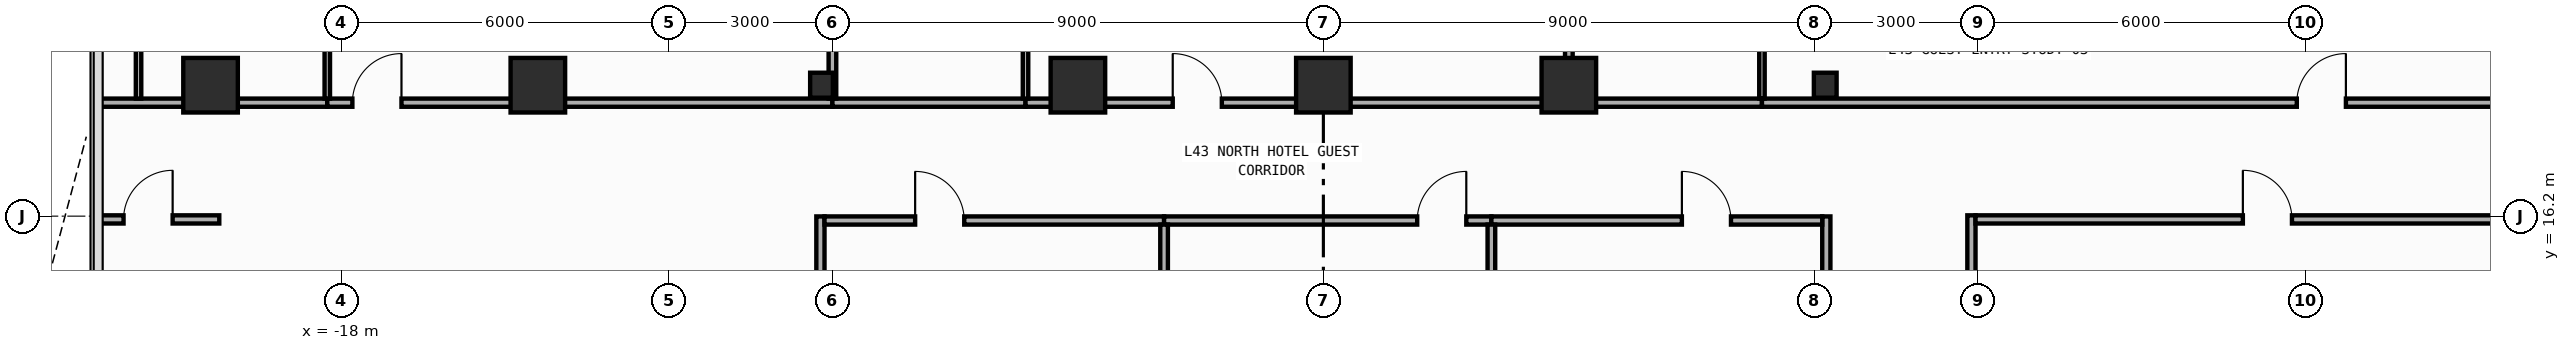
"""IFC4 building model, lengths in metres.
Left out: names, types, materials, properties, quantities, classifications, styles, units other than length and angle.
Written with IfcOpenShell. Run it as: python <this file> out.ifc"""

import sys

from ifc_helpers import new_model, si_unit, direction, frame, frame_2d, origin, origin_2d, place, context, subcontext, project, spatial, rectangle, i_section, extrude, element, fill, save


model = new_model("IFC4")
c1 = context("Model", 3, precision=1e-05, world=origin(), true_north=direction((0.0, 1.0)))
c2 = subcontext(c1, "Body", "Model", "MODEL_VIEW")
j1 = project(units=[si_unit("LENGTHUNIT", "METRE"), si_unit("PLANEANGLEUNIT", "RADIAN")], contexts=[c1])
p1 = place(None, origin())
s1 = spatial("IfcSite", under=j1, at=p1, CompositionType="ELEMENT")
p2 = place(p1, origin())
s2 = spatial("IfcBuilding", under=s1, at=p2, CompositionType="ELEMENT")
p3 = place(p2, frame((0.0, 0.0, 187.8)))
s3 = spatial("IfcBuildingStorey", under=s2, at=p3, CompositionType="ELEMENT", Elevation=187.8)
for number, where, z_axis, x_axis in (
    (1, (-9.2, 18.6, 0.0), (0.0, 0.0, 1.0), (1.0, 0.0, 0.0)),
    (2, (9.2, 18.6, 0.0), (0.0, 0.0, 1.0), (1.0, 0.0, 0.0)),
):
    element("IfcColumn", number, at=place(p3, frame(where, z_axis=z_axis, x_axis=x_axis)), inside=s3, PredefinedType="COLUMN", context=c2, shape_type="SweptSolid", body=[
        extrude(i_section(OverallWidth=0.417, OverallDepth=0.458, WebThickness=0.03, FlangeThickness=0.05, FilletRadius=0.022, at=origin_2d()), origin(), (0.0, 0.0, 1.0), 3.8),
    ])
for number, where, z_axis, x_axis in (
    (3, (-20.4, 18.6, 0.0), (0.0, 0.0, 1.0), (1.0, 0.0, 0.0)),
    (4, (-14.4, 18.6, 0.0), (0.0, 0.0, 1.0), (1.0, 0.0, 0.0)),
    (5, (-4.5, 18.6, 0.0), (0.0, 0.0, 1.0), (1.0, 0.0, 0.0)),
    (6, (0.0, 18.6, 0.0), (0.0, 0.0, 1.0), (1.0, 0.0, 0.0)),
    (7, (4.5, 18.6, 0.0), (0.0, 0.0, 1.0), (1.0, 0.0, 0.0)),
):
    element("IfcColumn", number, at=place(p3, frame(where, z_axis=z_axis, x_axis=x_axis)), inside=s3, PredefinedType="COLUMN", context=c2, shape_type="SweptSolid", body=[
        extrude(rectangle(XDim=1.0, YDim=1.0, at=origin_2d()), origin(), (0.0, 0.0, 1.0), 3.8),
    ])
p4 = place(p3, frame((-9.22, -5.8, 0.0), z_axis=(0.0, 0.0, 1.0), x_axis=(0.0, 1.0, 0.0)))
e8 = element("IfcWall", 8, at=p4, inside=s3, PredefinedType="PARTITIONING", context=c2, shape_type="SweptSolid", body=[
    extrude(rectangle(XDim=21.995, YDim=0.15, at=frame_2d((10.998, 0.0))), origin(), (0.0, 0.0, 1.0), 2.952),
])
p5 = place(p4, frame((10.749, 0.0, 0.0)))
e9 = element("IfcOpeningElement", 9, at=p5, cuts=e8, PredefinedType="OPENING", context=c2, shape_type="SweptSolid", body=[
    extrude(rectangle(XDim=0.9, YDim=2.15, at=frame_2d((0.45, 1.075))), frame((0.0, 0.085, 0.0), z_axis=(0.0, -1.0, 0.0), x_axis=(1.0, 0.0, 0.0)), (0.0, 0.0, 1.0), 0.17),
])
p6 = place(p3, frame((9.22, -5.8, 0.0), z_axis=(0.0, 0.0, 1.0), x_axis=(0.0, 1.0, 0.0)))
e10 = element("IfcWall", 10, at=p6, inside=s3, PredefinedType="PARTITIONING", context=c2, shape_type="SweptSolid", body=[
    extrude(rectangle(XDim=21.995, YDim=0.15, at=frame_2d((10.998, 0.0))), origin(), (0.0, 0.0, 1.0), 2.952),
])
p7 = place(p6, frame((10.749, 0.0, 0.0)))
e11 = element("IfcOpeningElement", 11, at=p7, cuts=e10, PredefinedType="OPENING", context=c2, shape_type="SweptSolid", body=[
    extrude(rectangle(XDim=0.9, YDim=2.15, at=frame_2d((0.45, 1.075))), frame((0.0, 0.085, 0.0), z_axis=(0.0, -1.0, 0.0), x_axis=(1.0, 0.0, 0.0)), (0.0, 0.0, 1.0), 0.17),
])
p8 = place(p3, frame((11.88, 7.16, 0.0), z_axis=(0.0, 0.0, 1.0), x_axis=(0.0, 1.0, 0.0)))
e12 = element("IfcWall", 12, at=p8, inside=s3, PredefinedType="PARTITIONING", context=c2, shape_type="SweptSolid", body=[
    extrude(rectangle(XDim=9.055, YDim=0.15, at=frame_2d((4.528, 0.0))), origin(), (0.0, 0.0, 1.0), 3.54),
])
p9 = place(p8, frame((0.46, 0.0, 0.0)))
e13 = element("IfcOpeningElement", 13, at=p9, cuts=e12, PredefinedType="OPENING", context=c2, shape_type="SweptSolid", body=[
    extrude(rectangle(XDim=0.9, YDim=2.15, at=frame_2d((0.45, 1.075))), frame((0.0, 0.085, 0.0), z_axis=(0.0, -1.0, 0.0), x_axis=(1.0, 0.0, 0.0)), (0.0, 0.0, 1.0), 0.17),
])
p10 = place(p3, frame((-9.145, 16.12, 0.0), z_axis=(0.0, 0.0, 1.0), x_axis=(1.0, 0.0, 0.0)))
e14 = element("IfcWall", 14, at=p10, inside=s3, PredefinedType="PARTITIONING", context=c2, shape_type="SweptSolid", body=[
    extrude(rectangle(XDim=6.225, YDim=0.15, at=frame_2d((3.113, 0.0))), origin(), (0.0, 0.0, 1.0), 3.54),
])
p11 = place(p10, frame((1.661, 0.0, 0.0)))
e15 = element("IfcOpeningElement", 15, at=p11, cuts=e14, PredefinedType="OPENING", context=c2, shape_type="SweptSolid", body=[
    extrude(rectangle(XDim=0.9, YDim=2.15, at=frame_2d((0.45, 1.075))), frame((0.0, 0.085, 0.0), z_axis=(0.0, -1.0, 0.0), x_axis=(1.0, 0.0, 0.0)), (0.0, 0.0, 1.0), 0.17),
])
p12 = place(p3, frame((-2.92, 16.12, 0.0), z_axis=(0.0, 0.0, 1.0), x_axis=(1.0, 0.0, 0.0)))
e16 = element("IfcWall", 16, at=p12, inside=s3, PredefinedType="PARTITIONING", context=c2, shape_type="SweptSolid", body=[
    extrude(rectangle(XDim=6.0, YDim=0.15, at=frame_2d((3.0, 0.0))), origin(), (0.0, 0.0, 1.0), 3.54),
])
p13 = place(p12, frame((4.64, 0.0, 0.0)))
e17 = element("IfcOpeningElement", 17, at=p13, cuts=e16, PredefinedType="OPENING", context=c2, shape_type="SweptSolid", body=[
    extrude(rectangle(XDim=0.9, YDim=2.15, at=frame_2d((0.45, 1.075))), frame((0.0, 0.085, 0.0), z_axis=(0.0, -1.0, 0.0), x_axis=(1.0, 0.0, 0.0)), (0.0, 0.0, 1.0), 0.17),
])
p14 = place(p3, frame((3.08, 16.12, 0.0), z_axis=(0.0, 0.0, 1.0), x_axis=(1.0, 0.0, 0.0)))
e18 = element("IfcWall", 18, at=p14, inside=s3, PredefinedType="PARTITIONING", context=c2, shape_type="SweptSolid", body=[
    extrude(rectangle(XDim=6.065, YDim=0.15, at=frame_2d((3.032, 0.0))), origin(), (0.0, 0.0, 1.0), 3.54),
])
p15 = place(p14, frame((3.492, 0.0, 0.0)))
e19 = element("IfcOpeningElement", 19, at=p15, cuts=e18, PredefinedType="OPENING", context=c2, shape_type="SweptSolid", body=[
    extrude(rectangle(XDim=0.9, YDim=2.15, at=frame_2d((0.45, 1.075))), frame((0.0, 0.085, 0.0), z_axis=(0.0, -1.0, 0.0), x_axis=(1.0, 0.0, 0.0)), (0.0, 0.0, 1.0), 0.17),
])
p16 = place(p3, frame((-22.455, 18.28, 0.0), z_axis=(0.0, 0.0, 1.0), x_axis=(1.0, 0.0, 0.0)))
e20 = element("IfcWall", 20, at=p16, inside=s3, PredefinedType="PARTITIONING", context=c2, shape_type="SweptSolid", body=[
    extrude(rectangle(XDim=4.195, YDim=0.15, at=frame_2d((2.098, 0.0))), origin(), (0.0, 0.0, 1.0), 2.952),
])
p17 = place(p3, frame((-18.26, 18.28, 0.0), z_axis=(0.0, 0.0, 1.0), x_axis=(1.0, 0.0, 0.0)))
e21 = element("IfcWall", 21, at=p17, inside=s3, PredefinedType="PARTITIONING", context=c2, shape_type="SweptSolid", body=[
    extrude(rectangle(XDim=9.26, YDim=0.15, at=frame_2d((4.63, 0.0))), origin(), (0.0, 0.0, 1.0), 2.952),
])
p18 = place(p17, frame((0.46, 0.0, 0.0)))
e22 = element("IfcOpeningElement", 22, at=p18, cuts=e21, PredefinedType="OPENING", context=c2, shape_type="SweptSolid", body=[
    extrude(rectangle(XDim=0.9, YDim=2.15, at=frame_2d((0.45, 1.075))), frame((0.0, 0.085, 0.0), z_axis=(0.0, -1.0, 0.0), x_axis=(1.0, 0.0, 0.0)), (0.0, 0.0, 1.0), 0.17),
])
p19 = place(p3, frame((-9.0, 18.28, 0.0), z_axis=(0.0, 0.0, 1.0), x_axis=(1.0, 0.0, 0.0)))
e23 = element("IfcWall", 23, at=p19, inside=s3, PredefinedType="PARTITIONING", context=c2, shape_type="SweptSolid", body=[
    extrude(rectangle(XDim=3.54, YDim=0.15, at=frame_2d((1.77, 0.0))), origin(), (0.0, 0.0, 1.0), 2.952),
])
p20 = place(p3, frame((-5.46, 18.28, 0.0), z_axis=(0.0, 0.0, 1.0), x_axis=(1.0, 0.0, 0.0)))
e24 = element("IfcWall", 24, at=p20, inside=s3, PredefinedType="PARTITIONING", context=c2, shape_type="SweptSolid", body=[
    extrude(rectangle(XDim=9.96, YDim=0.15, at=frame_2d((4.98, 0.0))), origin(), (0.0, 0.0, 1.0), 2.952),
])
p21 = place(p20, frame((2.698, 0.0, 0.0)))
e25 = element("IfcOpeningElement", 25, at=p21, cuts=e24, PredefinedType="OPENING", context=c2, shape_type="SweptSolid", body=[
    extrude(rectangle(XDim=0.9, YDim=2.15, at=frame_2d((0.45, 1.075))), frame((0.0, 0.085, 0.0), z_axis=(0.0, -1.0, 0.0), x_axis=(1.0, 0.0, 0.0)), (0.0, 0.0, 1.0), 0.17),
])
p22 = place(p3, frame((4.5, 18.28, 0.0), z_axis=(0.0, 0.0, 1.0), x_axis=(1.0, 0.0, 0.0)))
e26 = element("IfcWall", 26, at=p22, inside=s3, PredefinedType="PARTITIONING", context=c2, shape_type="SweptSolid", body=[
    extrude(rectangle(XDim=3.54, YDim=0.15, at=frame_2d((1.77, 0.0))), origin(), (0.0, 0.0, 1.0), 2.952),
])
p23 = place(p3, frame((8.04, 18.28, 0.0), z_axis=(0.0, 0.0, 1.0), x_axis=(1.0, 0.0, 0.0)))
e27 = element("IfcWall", 27, at=p23, inside=s3, PredefinedType="PARTITIONING", context=c2, shape_type="SweptSolid", body=[
    extrude(rectangle(XDim=14.415, YDim=0.15, at=frame_2d((7.208, 0.0))), origin(), (0.0, 0.0, 1.0), 2.952),
])
p24 = place(p23, frame((9.805, 0.0, 0.0)))
e28 = element("IfcOpeningElement", 28, at=p24, cuts=e27, PredefinedType="OPENING", context=c2, shape_type="SweptSolid", body=[
    extrude(rectangle(XDim=0.9, YDim=2.15, at=frame_2d((0.45, 1.075))), frame((0.0, 0.085, 0.0), z_axis=(0.0, -1.0, 0.0), x_axis=(1.0, 0.0, 0.0)), (0.0, 0.0, 1.0), 0.17),
])
p25 = place(p3, frame((11.955, 16.14, 0.0), z_axis=(0.0, 0.0, 1.0), x_axis=(1.0, 0.0, 0.0)))
e29 = element("IfcWall", 29, at=p25, inside=s3, PredefinedType="PARTITIONING", context=c2, shape_type="SweptSolid", body=[
    extrude(rectangle(XDim=10.5, YDim=0.15, at=frame_2d((5.25, 0.0))), origin(), (0.0, 0.0, 1.0), 3.54),
])
p26 = place(p25, frame((4.901, 0.0, 0.0)))
e30 = element("IfcOpeningElement", 30, at=p26, cuts=e29, PredefinedType="OPENING", context=c2, shape_type="SweptSolid", body=[
    extrude(rectangle(XDim=0.9, YDim=2.15, at=frame_2d((0.45, 1.075))), frame((0.0, 0.085, 0.0), z_axis=(0.0, -1.0, 0.0), x_axis=(1.0, 0.0, 0.0)), (0.0, 0.0, 1.0), 0.17),
])
p27 = place(p3, frame((-22.455, 16.14, 0.0), z_axis=(0.0, 0.0, 1.0), x_axis=(1.0, 0.0, 0.0)))
e31 = element("IfcWall", 31, at=p27, inside=s3, PredefinedType="PARTITIONING", context=c2, shape_type="SweptSolid", body=[
    extrude(rectangle(XDim=2.215, YDim=0.15, at=frame_2d((1.107, 0.0))), origin(), (0.0, 0.0, 1.0), 3.54),
])
p28 = place(p27, frame((0.46, 0.0, 0.0)))
e32 = element("IfcOpeningElement", 32, at=p28, cuts=e31, PredefinedType="OPENING", context=c2, shape_type="SweptSolid", body=[
    extrude(rectangle(XDim=0.9, YDim=2.15, at=frame_2d((0.45, 1.075))), frame((0.0, 0.085, 0.0), z_axis=(0.0, -1.0, 0.0), x_axis=(1.0, 0.0, 0.0)), (0.0, 0.0, 1.0), 0.17),
])
for number, where, z_axis, x_axis in (
    (33, (-2.92, -5.73, 0.0), (0.0, 0.0, 1.0), (0.0, 1.0, 0.0)),
    (34, (3.08, -5.73, 0.0), (0.0, 0.0, 1.0), (0.0, 1.0, 0.0)),
):
    element("IfcWall", number, at=place(p3, frame(where, z_axis=z_axis, x_axis=x_axis)), inside=s3, PredefinedType="PARTITIONING", context=c2, shape_type="SweptSolid", body=[
        extrude(rectangle(XDim=21.775, YDim=0.14, at=frame_2d((10.887, 0.0))), origin(), (0.0, 0.0, 1.0), 3.54),
    ])
p29 = place(p3, frame((-18.26, 18.355, 0.0), z_axis=(0.0, 0.0, 1.0), x_axis=(0.0, 1.0, 0.0)))
e35 = element("IfcWall", 35, at=p29, inside=s3, PredefinedType="PARTITIONING", context=c2, shape_type="SweptSolid", body=[
    extrude(rectangle(XDim=2.965, YDim=0.1, at=frame_2d((1.482, 0.0))), origin(), (0.0, 0.0, 1.0), 3.54),
])
p30 = place(p29, frame((1.705, 0.0, 0.0)))
e36 = element("IfcOpeningElement", 36, at=p30, cuts=e35, PredefinedType="OPENING", context=c2, shape_type="SweptSolid", body=[
    extrude(rectangle(XDim=0.8, YDim=2.1, at=frame_2d((0.4, 1.05))), frame((0.0, 0.06, 0.0), z_axis=(0.0, -1.0, 0.0), x_axis=(1.0, 0.0, 0.0)), (0.0, 0.0, 1.0), 0.12),
])
p31 = place(p3, frame((-9.0, 18.355, 0.0), z_axis=(0.0, 0.0, 1.0), x_axis=(0.0, 1.0, 0.0)))
e37 = element("IfcWall", 37, at=p31, inside=s3, PredefinedType="PARTITIONING", context=c2, shape_type="SweptSolid", body=[
    extrude(rectangle(XDim=3.015, YDim=0.14, at=frame_2d((1.508, 0.0))), origin(), (0.0, 0.0, 1.0), 2.952),
])
p32 = place(p3, frame((-5.46, 18.355, 0.0), z_axis=(0.0, 0.0, 1.0), x_axis=(0.0, 1.0, 0.0)))
e38 = element("IfcWall", 38, at=p32, inside=s3, PredefinedType="PARTITIONING", context=c2, shape_type="SweptSolid", body=[
    extrude(rectangle(XDim=2.965, YDim=0.1, at=frame_2d((1.482, 0.0))), origin(), (0.0, 0.0, 1.0), 3.54),
])
p33 = place(p32, frame((1.705, 0.0, 0.0)))
e39 = element("IfcOpeningElement", 39, at=p33, cuts=e38, PredefinedType="OPENING", context=c2, shape_type="SweptSolid", body=[
    extrude(rectangle(XDim=0.8, YDim=2.1, at=frame_2d((0.4, 1.05))), frame((0.0, 0.06, 0.0), z_axis=(0.0, -1.0, 0.0), x_axis=(1.0, 0.0, 0.0)), (0.0, 0.0, 1.0), 0.12),
])
p34 = place(p3, frame((4.5, 18.355, 0.0), z_axis=(0.0, 0.0, 1.0), x_axis=(0.0, 1.0, 0.0)))
e40 = element("IfcWall", 40, at=p34, inside=s3, PredefinedType="PARTITIONING", context=c2, shape_type="SweptSolid", body=[
    extrude(rectangle(XDim=3.015, YDim=0.14, at=frame_2d((1.508, 0.0))), origin(), (0.0, 0.0, 1.0), 3.54),
])
p35 = place(p3, frame((8.04, 18.355, 0.0), z_axis=(0.0, 0.0, 1.0), x_axis=(0.0, 1.0, 0.0)))
e41 = element("IfcWall", 41, at=p35, inside=s3, PredefinedType="PARTITIONING", context=c2, shape_type="SweptSolid", body=[
    extrude(rectangle(XDim=2.965, YDim=0.1, at=frame_2d((1.482, 0.0))), origin(), (0.0, 0.0, 1.0), 3.54),
])
p36 = place(p35, frame((1.705, 0.0, 0.0)))
e42 = element("IfcOpeningElement", 42, at=p36, cuts=e41, PredefinedType="OPENING", context=c2, shape_type="SweptSolid", body=[
    extrude(rectangle(XDim=0.8, YDim=2.1, at=frame_2d((0.4, 1.05))), frame((0.0, 0.06, 0.0), z_axis=(0.0, -1.0, 0.0), x_axis=(1.0, 0.0, 0.0)), (0.0, 0.0, 1.0), 0.12),
])
p37 = place(p3, frame((-21.72, 18.355, 0.0), z_axis=(0.0, 0.0, 1.0), x_axis=(0.0, 1.0, 0.0)))
e43 = element("IfcWall", 43, at=p37, inside=s3, PredefinedType="PARTITIONING", context=c2, shape_type="SweptSolid", body=[
    extrude(rectangle(XDim=2.965, YDim=0.1, at=frame_2d((1.482, 0.0))), origin(), (0.0, 0.0, 1.0), 3.54),
])
p38 = place(p11, origin())
e44 = element("IfcDoor", 44, at=p38, inside=s3, OperationType="SINGLE_SWING_LEFT", PredefinedType="DOOR", context=c2, shape_type="SweptSolid", body=[
    extrude(rectangle(XDim=0.9, YDim=2.15, at=frame_2d((0.45, 1.075))), frame((0.0, 0.025, 0.0), z_axis=(0.0, -1.0, 0.0), x_axis=(1.0, 0.0, 0.0)), (0.0, 0.0, 1.0), 0.05),
])
fill(e15, e44)
p39 = place(p13, origin())
e45 = element("IfcDoor", 45, at=p39, inside=s3, OperationType="SINGLE_SWING_RIGHT", PredefinedType="DOOR", context=c2, shape_type="SweptSolid", body=[
    extrude(rectangle(XDim=0.9, YDim=2.15, at=frame_2d((0.45, 1.075))), frame((0.0, 0.025, 0.0), z_axis=(0.0, -1.0, 0.0), x_axis=(1.0, 0.0, 0.0)), (0.0, 0.0, 1.0), 0.05),
])
fill(e17, e45)
p40 = place(p15, origin())
e46 = element("IfcDoor", 46, at=p40, inside=s3, OperationType="SINGLE_SWING_LEFT", PredefinedType="DOOR", context=c2, shape_type="SweptSolid", body=[
    extrude(rectangle(XDim=0.9, YDim=2.15, at=frame_2d((0.45, 1.075))), frame((0.0, 0.025, 0.0), z_axis=(0.0, -1.0, 0.0), x_axis=(1.0, 0.0, 0.0)), (0.0, 0.0, 1.0), 0.05),
])
fill(e19, e46)
p41 = place(p18, origin())
e47 = element("IfcDoor", 47, at=p41, inside=s3, OperationType="SINGLE_SWING_RIGHT", PredefinedType="DOOR", context=c2, shape_type="SweptSolid", body=[
    extrude(rectangle(XDim=0.9, YDim=2.15, at=frame_2d((0.45, 1.075))), frame((0.0, 0.025, 0.0), z_axis=(0.0, -1.0, 0.0), x_axis=(1.0, 0.0, 0.0)), (0.0, 0.0, 1.0), 0.05),
])
fill(e22, e47)
p42 = place(p21, origin())
e48 = element("IfcDoor", 48, at=p42, inside=s3, OperationType="SINGLE_SWING_LEFT", PredefinedType="DOOR", context=c2, shape_type="SweptSolid", body=[
    extrude(rectangle(XDim=0.9, YDim=2.15, at=frame_2d((0.45, 1.075))), frame((0.0, 0.025, 0.0), z_axis=(0.0, -1.0, 0.0), x_axis=(1.0, 0.0, 0.0)), (0.0, 0.0, 1.0), 0.05),
])
fill(e25, e48)
p43 = place(p24, origin())
e49 = element("IfcDoor", 49, at=p43, inside=s3, OperationType="SINGLE_SWING_RIGHT", PredefinedType="DOOR", context=c2, shape_type="SweptSolid", body=[
    extrude(rectangle(XDim=0.9, YDim=2.15, at=frame_2d((0.45, 1.075))), frame((0.0, 0.025, 0.0), z_axis=(0.0, -1.0, 0.0), x_axis=(1.0, 0.0, 0.0)), (0.0, 0.0, 1.0), 0.05),
])
fill(e28, e49)
p44 = place(p26, origin())
e50 = element("IfcDoor", 50, at=p44, inside=s3, OperationType="SINGLE_SWING_LEFT", PredefinedType="DOOR", context=c2, shape_type="SweptSolid", body=[
    extrude(rectangle(XDim=0.9, YDim=2.15, at=frame_2d((0.45, 1.075))), frame((0.0, 0.025, 0.0), z_axis=(0.0, -1.0, 0.0), x_axis=(1.0, 0.0, 0.0)), (0.0, 0.0, 1.0), 0.05),
])
fill(e30, e50)
p45 = place(p28, origin())
e51 = element("IfcDoor", 51, at=p45, inside=s3, OperationType="SINGLE_SWING_RIGHT", PredefinedType="DOOR", context=c2, shape_type="SweptSolid", body=[
    extrude(rectangle(XDim=0.9, YDim=2.15, at=frame_2d((0.45, 1.075))), frame((0.0, 0.025, 0.0), z_axis=(0.0, -1.0, 0.0), x_axis=(1.0, 0.0, 0.0)), (0.0, 0.0, 1.0), 0.05),
])
fill(e32, e51)
save(model, sys.argv[1])
